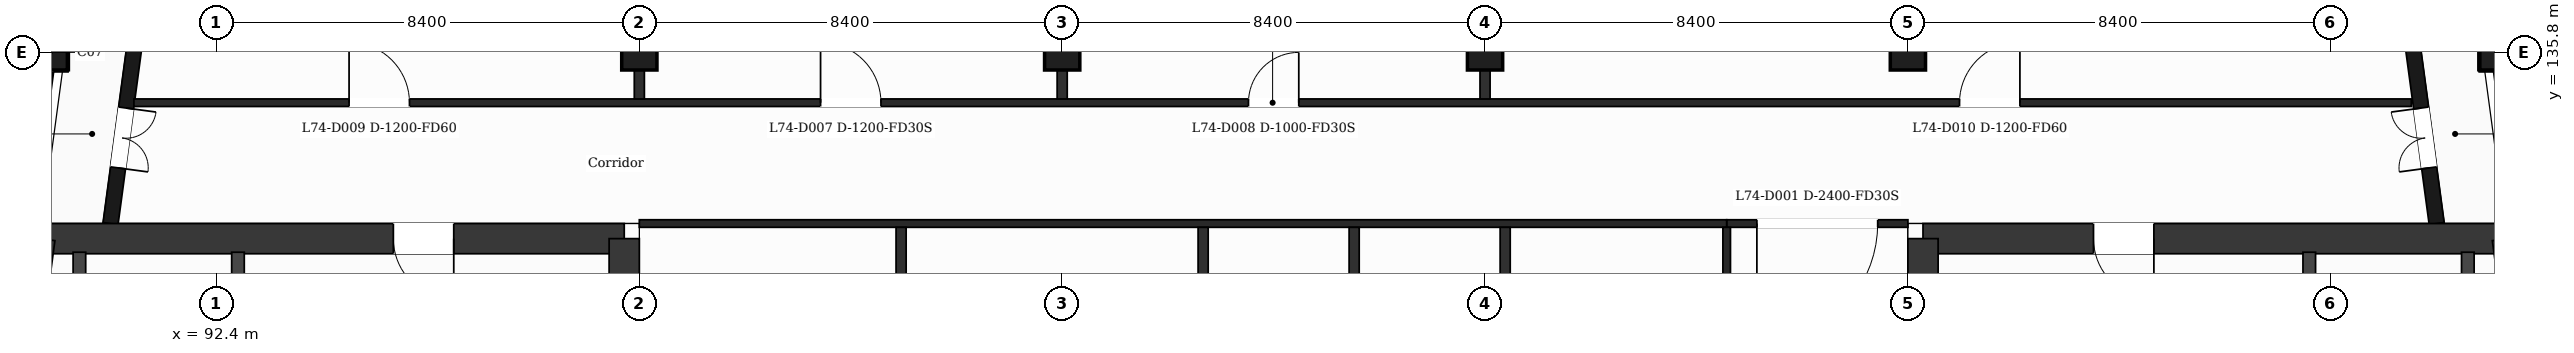
"""IFC4 building model, lengths in metres.
Left out: names, types, materials, properties, quantities, classifications, styles, units other than length and angle.
Written with IfcOpenShell. Run it as: python <this file> out.ifc"""

import sys

from ifc_helpers import new_model, si_unit, direction, frame, frame_2d, origin, origin_2d, place, context, subcontext, project, spatial, rectangle, extrude, element, fill, save


model = new_model("IFC4")
c1 = context("Model", 3, precision=1e-05, world=origin(), true_north=direction((0.0, 1.0)))
c2 = subcontext(c1, "Body", "Model", "MODEL_VIEW")
j1 = project(units=[si_unit("LENGTHUNIT", "METRE"), si_unit("PLANEANGLEUNIT", "RADIAN")], contexts=[c1])
p1 = place(None, origin())
s1 = spatial("IfcSite", under=j1, at=p1, CompositionType="ELEMENT")
p2 = place(p1, origin())
s2 = spatial("IfcBuilding", under=s1, at=p2, CompositionType="ELEMENT")
p3 = place(p2, frame((0.0, 0.0, 303.4)))
s3 = spatial("IfcBuildingStorey", under=s2, at=p3, CompositionType="ELEMENT", Elevation=303.4)
p4 = place(p3, frame((88.893, 132.1, 0.0), z_axis=(0.0, 0.0, 1.0), x_axis=(1.0, 0.0, 0.0)))
e1 = element("IfcWall", 1, at=p4, inside=s3, PredefinedType="SHEAR", context=c2, shape_type="SweptSolid", body=[
    extrude(rectangle(XDim=11.607, YDim=0.6, at=frame_2d((5.803, 0.0))), origin(), (0.0, 0.0, 1.0), 4.5),
])
p5 = place(p4, frame((7.021, 0.0, 0.0)))
e2 = element("IfcOpeningElement", 2, at=p5, cuts=e1, PredefinedType="OPENING", context=c2, shape_type="SweptSolid", body=[
    extrude(rectangle(XDim=1.2, YDim=2.1, at=frame_2d((0.6, 1.05))), frame((0.0, 0.31, 0.0), z_axis=(0.0, -1.0, 0.0), x_axis=(1.0, 0.0, 0.0)), (0.0, 0.0, 1.0), 0.62),
])
p6 = place(p3, frame((100.5, 132.1, 0.0), z_axis=(0.0, 0.0, 1.0), x_axis=(0.0, -1.0, 0.0)))
e3 = element("IfcWall", 3, at=p6, inside=s3, PredefinedType="SHEAR", context=c2, shape_type="SweptSolid", body=[
    extrude(rectangle(XDim=15.8, YDim=0.6, at=frame_2d((7.9, 0.0))), origin(), (0.0, 0.0, 1.0), 4.5),
])
p7 = place(p6, frame((7.95, 0.0, 0.0)))
e4 = element("IfcOpeningElement", 4, at=p7, cuts=e3, PredefinedType="OPENING", context=c2, shape_type="SweptSolid", body=[
    extrude(rectangle(XDim=1.4, YDim=2.1, at=frame_2d((0.7, 1.05))), frame((0.0, 0.31, 0.0), z_axis=(0.0, -1.0, 0.0), x_axis=(1.0, 0.0, 0.0)), (0.0, 0.0, 1.0), 0.62),
])
p8 = place(p3, frame((86.766, 116.3, 0.0), z_axis=(0.0, 0.0, 1.0), x_axis=(0.13341345841, 0.991060466932, 0.0)))
e5 = element("IfcWall", 5, at=p8, inside=s3, PredefinedType="SHEAR", context=c2, shape_type="SweptSolid", body=[
    extrude(rectangle(XDim=15.943, YDim=0.6, at=frame_2d((7.971, 0.0))), origin(), (0.0, 0.0, 1.0), 4.5),
])
p9 = place(p3, frame((126.3, 132.1, 0.0), z_axis=(0.0, 0.0, 1.0), x_axis=(1.0, 0.0, 0.0)))
e6 = element("IfcWall", 6, at=p9, inside=s3, PredefinedType="SHEAR", context=c2, shape_type="SweptSolid", body=[
    extrude(rectangle(XDim=11.607, YDim=0.6, at=frame_2d((5.803, 0.0))), origin(), (0.0, 0.0, 1.0), 4.5),
])
p10 = place(p9, frame((3.386, 0.0, 0.0)))
e7 = element("IfcOpeningElement", 7, at=p10, cuts=e6, PredefinedType="OPENING", context=c2, shape_type="SweptSolid", body=[
    extrude(rectangle(XDim=1.2, YDim=2.1, at=frame_2d((0.6, 1.05))), frame((0.0, 0.31, 0.0), z_axis=(0.0, -1.0, 0.0), x_axis=(1.0, 0.0, 0.0)), (0.0, 0.0, 1.0), 0.62),
])
p11 = place(p3, frame((137.907, 132.1, 0.0), z_axis=(0.0, 0.0, 1.0), x_axis=(0.13341345841, -0.991060466932, 0.0)))
e8 = element("IfcWall", 8, at=p11, inside=s3, PredefinedType="SHEAR", context=c2, shape_type="SweptSolid", body=[
    extrude(rectangle(XDim=15.943, YDim=0.6, at=frame_2d((7.971, 0.0))), origin(), (0.0, 0.0, 1.0), 4.5),
])
p12 = place(p3, frame((126.3, 116.3, 0.0), z_axis=(0.0, 0.0, 1.0), x_axis=(0.0, 1.0, 0.0)))
e9 = element("IfcWall", 9, at=p12, inside=s3, PredefinedType="SHEAR", context=c2, shape_type="SweptSolid", body=[
    extrude(rectangle(XDim=15.8, YDim=0.6, at=frame_2d((7.9, 0.0))), origin(), (0.0, 0.0, 1.0), 4.5),
])
p13 = place(p12, frame((6.45, 0.0, 0.0)))
e10 = element("IfcOpeningElement", 10, at=p13, cuts=e9, PredefinedType="OPENING", context=c2, shape_type="SweptSolid", body=[
    extrude(rectangle(XDim=1.4, YDim=2.1, at=frame_2d((0.7, 1.05))), frame((0.0, 0.31, 0.0), z_axis=(0.0, -1.0, 0.0), x_axis=(1.0, 0.0, 0.0)), (0.0, 0.0, 1.0), 0.62),
])
for number, where, z_axis, x_axis in (
    (11, (100.8, 135.8, 0.0), (0.0, 0.0, 1.0), (1.0, 0.0, 0.0)),
    (12, (109.2, 135.8, 0.0), (0.0, 0.0, 1.0), (1.0, 0.0, 0.0)),
    (13, (117.6, 135.8, 0.0), (0.0, 0.0, 1.0), (1.0, 0.0, 0.0)),
    (14, (126.0, 135.8, 0.0), (0.0, 0.0, 1.0), (1.0, 0.0, 0.0)),
    (15, (89.088, 135.8, 0.0), (0.0, 0.0, 1.0), (1.0, 0.0, 0.0)),
    (16, (137.711, 135.8, 0.0), (0.0, 0.0, 1.0), (1.0, 0.0, 0.0)),
):
    element("IfcColumn", number, at=place(p3, frame(where, z_axis=z_axis, x_axis=x_axis)), inside=s3, PredefinedType="COLUMN", context=c2, shape_type="SweptSolid", body=[
        extrude(rectangle(XDim=0.7, YDim=0.7, at=origin_2d()), origin(), (0.0, 0.0, 1.0), 4.5),
    ])
p14 = place(p3, frame((91.177, 138.95, 0.0), z_axis=(0.0, 0.0, 1.0), x_axis=(-0.133426664613, -0.991058689065, 0.0)))
e17 = element("IfcWall", 17, at=p14, inside=s3, PredefinedType="SOLIDWALL", context=c2, shape_type="SweptSolid", body=[
    extrude(rectangle(XDim=6.609, YDim=0.3, at=frame_2d((3.305, 0.0))), origin(), (0.0, 0.0, 1.0), 4.05),
])
p15 = place(p14, frame((1.039, 0.0, 0.9)))
e18 = element("IfcOpeningElement", 18, at=p15, cuts=e17, PredefinedType="OPENING", context=c2, shape_type="SweptSolid", body=[
    extrude(rectangle(XDim=1.2, YDim=2.1, at=frame_2d((0.6, 1.05))), frame((0.0, 0.16, 0.0), z_axis=(0.0, -1.0, 0.0), x_axis=(1.0, 0.0, 0.0)), (0.0, 0.0, 1.0), 0.32),
])
p16 = place(p14, frame((4.294, 0.0, 0.0)))
e19 = element("IfcOpeningElement", 19, at=p16, cuts=e17, PredefinedType="OPENING", context=c2, shape_type="SweptSolid", body=[
    extrude(rectangle(XDim=1.2, YDim=2.4, at=frame_2d((0.6, 1.2))), frame((0.0, 0.16, 0.0), z_axis=(0.0, -1.0, 0.0), x_axis=(1.0, 0.0, 0.0)), (0.0, 0.0, 1.0), 0.32),
])
p17 = place(p3, frame((136.504, 132.4, 0.0), z_axis=(0.0, 0.0, 1.0), x_axis=(-0.133399697462, 0.99106231929, 0.0)))
e20 = element("IfcWall", 20, at=p17, inside=s3, PredefinedType="SOLIDWALL", context=c2, shape_type="SweptSolid", body=[
    extrude(rectangle(XDim=6.74, YDim=0.3, at=frame_2d((3.37, 0.0))), origin(), (0.0, 0.0, 1.0), 4.05),
])
p18 = place(p17, frame((1.115, 0.0, 0.0)))
e21 = element("IfcOpeningElement", 21, at=p18, cuts=e20, PredefinedType="OPENING", context=c2, shape_type="SweptSolid", body=[
    extrude(rectangle(XDim=1.2, YDim=2.4, at=frame_2d((0.6, 1.2))), frame((0.0, 0.16, 0.0), z_axis=(0.0, -1.0, 0.0), x_axis=(1.0, 0.0, 0.0)), (0.0, 0.0, 1.0), 0.32),
])
p19 = place(p17, frame((3.835, 0.0, 0.9)))
e22 = element("IfcOpeningElement", 22, at=p19, cuts=e20, PredefinedType="OPENING", context=c2, shape_type="SweptSolid", body=[
    extrude(rectangle(XDim=2.4, YDim=2.1, at=frame_2d((1.2, 1.05))), frame((0.0, 0.16, 0.0), z_axis=(0.0, -1.0, 0.0), x_axis=(1.0, 0.0, 0.0)), (0.0, 0.0, 1.0), 0.32),
])
p20 = place(p3, frame((122.4, 132.4, 0.0), z_axis=(0.0, 0.0, 1.0), x_axis=(1.0, 0.0, 0.0)))
e23 = element("IfcWall", 23, at=p20, inside=s3, PredefinedType="PARTITIONING", context=c2, shape_type="SweptSolid", body=[
    extrude(rectangle(XDim=3.6, YDim=0.15, at=frame_2d((1.8, 0.0))), origin(), (0.0, 0.0, 1.0), 4.05),
])
p21 = place(p20, frame((0.6, 0.0, 0.0)))
e24 = element("IfcOpeningElement", 24, at=p21, cuts=e23, PredefinedType="OPENING", context=c2, shape_type="SweptSolid", body=[
    extrude(rectangle(XDim=2.4, YDim=2.1, at=frame_2d((1.2, 1.05))), frame((0.0, 0.085, 0.0), z_axis=(0.0, -1.0, 0.0), x_axis=(1.0, 0.0, 0.0)), (0.0, 0.0, 1.0), 0.17),
])
p22 = place(p3, frame((100.8, 132.4, 0.0), z_axis=(0.0, 0.0, 1.0), x_axis=(1.0, 0.0, 0.0)))
e25 = element("IfcWall", 25, at=p22, inside=s3, PredefinedType="PARTITIONING", context=c2, shape_type="SweptSolid", body=[
    extrude(rectangle(XDim=21.6, YDim=0.15, at=frame_2d((10.8, 0.0))), origin(), (0.0, 0.0, 1.0), 4.05),
])
p23 = place(p3, frame((90.76, 134.8, 0.0), z_axis=(0.0, 0.0, 1.0), x_axis=(1.0, 0.0, 0.0)))
e26 = element("IfcWall", 26, at=p23, inside=s3, PredefinedType="PARTITIONING", context=c2, shape_type="SweptSolid", body=[
    extrude(rectangle(XDim=45.24, YDim=0.15, at=frame_2d((22.62, 0.0))), origin(), (0.0, 0.0, 1.0), 4.05),
])
p24 = place(p23, frame((13.64, 0.0, 0.0)))
e27 = element("IfcOpeningElement", 27, at=p24, cuts=e26, PredefinedType="OPENING", context=c2, shape_type="SweptSolid", body=[
    extrude(rectangle(XDim=1.2, YDim=2.1, at=frame_2d((0.6, 1.05))), frame((0.0, 0.085, 0.0), z_axis=(0.0, -1.0, 0.0), x_axis=(1.0, 0.0, 0.0)), (0.0, 0.0, 1.0), 0.17),
])
p25 = place(p23, frame((22.14, 0.0, 0.0)))
e28 = element("IfcOpeningElement", 28, at=p25, cuts=e26, PredefinedType="OPENING", context=c2, shape_type="SweptSolid", body=[
    extrude(rectangle(XDim=1.0, YDim=2.1, at=frame_2d((0.5, 1.05))), frame((0.0, 0.085, 0.0), z_axis=(0.0, -1.0, 0.0), x_axis=(1.0, 0.0, 0.0)), (0.0, 0.0, 1.0), 0.17),
])
p26 = place(p23, frame((4.274, 0.0, 0.0)))
e29 = element("IfcOpeningElement", 29, at=p26, cuts=e26, PredefinedType="OPENING", context=c2, shape_type="SweptSolid", body=[
    extrude(rectangle(XDim=1.2, YDim=2.1, at=frame_2d((0.6, 1.05))), frame((0.0, 0.085, 0.0), z_axis=(0.0, -1.0, 0.0), x_axis=(1.0, 0.0, 0.0)), (0.0, 0.0, 1.0), 0.17),
])
p27 = place(p23, frame((36.265, 0.0, 0.0)))
e30 = element("IfcOpeningElement", 30, at=p27, cuts=e26, PredefinedType="OPENING", context=c2, shape_type="SweptSolid", body=[
    extrude(rectangle(XDim=1.2, YDim=2.1, at=frame_2d((0.6, 1.05))), frame((0.0, 0.085, 0.0), z_axis=(0.0, -1.0, 0.0), x_axis=(1.0, 0.0, 0.0)), (0.0, 0.0, 1.0), 0.17),
])
p28 = place(p3, frame((89.677, 124.575, 0.0), z_axis=(0.0, 0.0, 1.0), x_axis=(0.0, 1.0, 0.0)))
e31 = element("IfcWall", 31, at=p28, inside=s3, PredefinedType="PARTITIONING", context=c2, shape_type="SweptSolid", body=[
    extrude(rectangle(XDim=7.255, YDim=0.25, at=frame_2d((3.627, 0.0))), origin(), (0.0, 0.0, 1.0), 4.05),
])
p29 = place(p3, frame((92.827, 124.575, 0.0), z_axis=(0.0, 0.0, 1.0), x_axis=(0.0, 1.0, 0.0)))
e32 = element("IfcWall", 32, at=p29, inside=s3, PredefinedType="PARTITIONING", context=c2, shape_type="SweptSolid", body=[
    extrude(rectangle(XDim=7.255, YDim=0.25, at=frame_2d((3.627, 0.0))), origin(), (0.0, 0.0, 1.0), 4.05),
])
p30 = place(p29, frame((5.325, 0.0, 0.0)))
e33 = element("IfcOpeningElement", 33, at=p30, cuts=e32, PredefinedType="OPENING", context=c2, shape_type="SweptSolid", body=[
    extrude(rectangle(XDim=1.0, YDim=2.1, at=frame_2d((0.5, 1.05))), frame((0.0, 0.135, 0.0), z_axis=(0.0, -1.0, 0.0), x_axis=(1.0, 0.0, 0.0)), (0.0, 0.0, 1.0), 0.27),
])
p31 = place(p3, frame((100.8, 134.875, 0.0), z_axis=(0.0, 0.0, 1.0), x_axis=(0.0, 1.0, 0.0)))
e34 = element("IfcWall", 34, at=p31, inside=s3, PredefinedType="PARTITIONING", context=c2, shape_type="SweptSolid", body=[
    extrude(rectangle(XDim=8.135, YDim=0.2, at=frame_2d((4.067, 0.0))), origin(), (0.0, 0.0, 1.0), 4.05),
])
p32 = place(p3, frame((106.0, 125.575, 0.0), z_axis=(0.0, 0.0, 1.0), x_axis=(0.0, 1.0, 0.0)))
e35 = element("IfcWall", 35, at=p32, inside=s3, PredefinedType="PARTITIONING", context=c2, shape_type="SweptSolid", body=[
    extrude(rectangle(XDim=6.75, YDim=0.2, at=frame_2d((3.375, 0.0))), origin(), (0.0, 0.0, 1.0), 4.05),
])
p33 = place(p3, frame((109.2, 134.875, 0.0), z_axis=(0.0, 0.0, 1.0), x_axis=(0.0, 1.0, 0.0)))
e36 = element("IfcWall", 36, at=p33, inside=s3, PredefinedType="PARTITIONING", context=c2, shape_type="SweptSolid", body=[
    extrude(rectangle(XDim=8.135, YDim=0.2, at=frame_2d((4.067, 0.0))), origin(), (0.0, 0.0, 1.0), 4.05),
])
for number, where, z_axis, x_axis in (
    (37, (112.0, 125.575, 0.0), (0.0, 0.0, 1.0), (0.0, 1.0, 0.0)),
    (38, (115.0, 125.575, 0.0), (0.0, 0.0, 1.0), (0.0, 1.0, 0.0)),
):
    element("IfcWall", number, at=place(p3, frame(where, z_axis=z_axis, x_axis=x_axis)), inside=s3, PredefinedType="PARTITIONING", context=c2, shape_type="SweptSolid", body=[
        extrude(rectangle(XDim=6.75, YDim=0.2, at=frame_2d((3.375, 0.0))), origin(), (0.0, 0.0, 1.0), 4.05),
    ])
p34 = place(p3, frame((117.6, 134.875, 0.0), z_axis=(0.0, 0.0, 1.0), x_axis=(0.0, 1.0, 0.0)))
e39 = element("IfcWall", 39, at=p34, inside=s3, PredefinedType="PARTITIONING", context=c2, shape_type="SweptSolid", body=[
    extrude(rectangle(XDim=8.135, YDim=0.2, at=frame_2d((4.067, 0.0))), origin(), (0.0, 0.0, 1.0), 4.05),
])
p35 = place(p3, frame((118.0, 125.575, 0.0), z_axis=(0.0, 0.0, 1.0), x_axis=(0.0, 1.0, 0.0)))
e40 = element("IfcWall", 40, at=p35, inside=s3, PredefinedType="PARTITIONING", context=c2, shape_type="SweptSolid", body=[
    extrude(rectangle(XDim=6.75, YDim=0.2, at=frame_2d((3.375, 0.0))), origin(), (0.0, 0.0, 1.0), 4.05),
])
p36 = place(p3, frame((122.4, 125.575, 0.0), z_axis=(0.0, 0.0, 1.0), x_axis=(0.0, 1.0, 0.0)))
e41 = element("IfcWall", 41, at=p36, inside=s3, PredefinedType="PARTITIONING", context=c2, shape_type="SweptSolid", body=[
    extrude(rectangle(XDim=6.75, YDim=0.15, at=frame_2d((3.375, 0.0))), origin(), (0.0, 0.0, 1.0), 4.05),
])
p37 = place(p36, frame((2.875, 0.0, 0.0)))
e42 = element("IfcOpeningElement", 42, at=p37, cuts=e41, PredefinedType="OPENING", context=c2, shape_type="SweptSolid", body=[
    extrude(rectangle(XDim=1.0, YDim=2.1, at=frame_2d((0.5, 1.05))), frame((0.0, 0.085, 0.0), z_axis=(0.0, -1.0, 0.0), x_axis=(1.0, 0.0, 0.0)), (0.0, 0.0, 1.0), 0.17),
])
p38 = place(p3, frame((133.973, 124.575, 0.0), z_axis=(0.0, 0.0, 1.0), x_axis=(0.0, 1.0, 0.0)))
e43 = element("IfcWall", 43, at=p38, inside=s3, PredefinedType="PARTITIONING", context=c2, shape_type="SweptSolid", body=[
    extrude(rectangle(XDim=7.255, YDim=0.25, at=frame_2d((3.627, 0.0))), origin(), (0.0, 0.0, 1.0), 4.05),
])
p39 = place(p38, frame((5.325, 0.0, 0.0)))
e44 = element("IfcOpeningElement", 44, at=p39, cuts=e43, PredefinedType="OPENING", context=c2, shape_type="SweptSolid", body=[
    extrude(rectangle(XDim=1.0, YDim=2.1, at=frame_2d((0.5, 1.05))), frame((0.0, 0.135, 0.0), z_axis=(0.0, -1.0, 0.0), x_axis=(1.0, 0.0, 0.0)), (0.0, 0.0, 1.0), 0.27),
])
p40 = place(p3, frame((137.123, 124.575, 0.0), z_axis=(0.0, 0.0, 1.0), x_axis=(0.0, 1.0, 0.0)))
e45 = element("IfcWall", 45, at=p40, inside=s3, PredefinedType="PARTITIONING", context=c2, shape_type="SweptSolid", body=[
    extrude(rectangle(XDim=7.255, YDim=0.25, at=frame_2d((3.627, 0.0))), origin(), (0.0, 0.0, 1.0), 4.05),
])
p41 = place(p16, origin())
e46 = element("IfcDoor", 46, at=p41, inside=s3, OperationType="DOUBLE_DOOR_SINGLE_SWING", PredefinedType="DOOR", context=c2, shape_type="SweptSolid", body=[
    extrude(rectangle(XDim=1.2, YDim=2.4, at=frame_2d((0.6, 1.2))), frame((0.0, 0.025, 0.0), z_axis=(0.0, -1.0, 0.0), x_axis=(1.0, 0.0, 0.0)), (0.0, 0.0, 1.0), 0.05),
])
fill(e19, e46)
p42 = place(p18, origin())
e47 = element("IfcDoor", 47, at=p42, inside=s3, OperationType="DOUBLE_DOOR_SINGLE_SWING", PredefinedType="DOOR", context=c2, shape_type="SweptSolid", body=[
    extrude(rectangle(XDim=1.2, YDim=2.4, at=frame_2d((0.6, 1.2))), frame((0.0, 0.025, 0.0), z_axis=(0.0, -1.0, 0.0), x_axis=(1.0, 0.0, 0.0)), (0.0, 0.0, 1.0), 0.05),
])
fill(e21, e47)
p43 = place(p21, origin())
e48 = element("IfcDoor", 48, at=p43, inside=s3, OperationType="SINGLE_SWING_LEFT", PredefinedType="DOOR", context=c2, shape_type="SweptSolid", body=[
    extrude(rectangle(XDim=2.4, YDim=2.1, at=frame_2d((1.2, 1.05))), frame((0.0, 0.025, 0.0), z_axis=(0.0, -1.0, 0.0), x_axis=(1.0, 0.0, 0.0)), (0.0, 0.0, 1.0), 0.05),
])
fill(e24, e48)
p44 = place(p24, origin())
e49 = element("IfcDoor", 49, at=p44, inside=s3, OperationType="SINGLE_SWING_LEFT", PredefinedType="DOOR", context=c2, shape_type="SweptSolid", body=[
    extrude(rectangle(XDim=1.2, YDim=2.1, at=frame_2d((0.6, 1.05))), frame((0.0, 0.025, 0.0), z_axis=(0.0, -1.0, 0.0), x_axis=(1.0, 0.0, 0.0)), (0.0, 0.0, 1.0), 0.05),
])
fill(e27, e49)
p45 = place(p25, origin())
e50 = element("IfcDoor", 50, at=p45, inside=s3, OperationType="SINGLE_SWING_RIGHT", PredefinedType="DOOR", context=c2, shape_type="SweptSolid", body=[
    extrude(rectangle(XDim=1.0, YDim=2.1, at=frame_2d((0.5, 1.05))), frame((0.0, 0.025, 0.0), z_axis=(0.0, -1.0, 0.0), x_axis=(1.0, 0.0, 0.0)), (0.0, 0.0, 1.0), 0.05),
])
fill(e28, e50)
p46 = place(p26, origin())
e51 = element("IfcDoor", 51, at=p46, inside=s3, OperationType="SINGLE_SWING_LEFT", PredefinedType="DOOR", context=c2, shape_type="SweptSolid", body=[
    extrude(rectangle(XDim=1.2, YDim=2.1, at=frame_2d((0.6, 1.05))), frame((0.0, 0.025, 0.0), z_axis=(0.0, -1.0, 0.0), x_axis=(1.0, 0.0, 0.0)), (0.0, 0.0, 1.0), 0.05),
])
fill(e29, e51)
p47 = place(p27, origin())
e52 = element("IfcDoor", 52, at=p47, inside=s3, OperationType="SINGLE_SWING_RIGHT", PredefinedType="DOOR", context=c2, shape_type="SweptSolid", body=[
    extrude(rectangle(XDim=1.2, YDim=2.1, at=frame_2d((0.6, 1.05))), frame((0.0, 0.025, 0.0), z_axis=(0.0, -1.0, 0.0), x_axis=(1.0, 0.0, 0.0)), (0.0, 0.0, 1.0), 0.05),
])
fill(e30, e52)
p48 = place(p5, origin())
e53 = element("IfcDoor", 53, at=p48, inside=s3, OperationType="SINGLE_SWING_RIGHT", PredefinedType="DOOR", context=c2, shape_type="SweptSolid", body=[
    extrude(rectangle(XDim=1.2, YDim=2.1, at=frame_2d((0.6, 1.05))), frame((0.0, 0.025, 0.0), z_axis=(0.0, -1.0, 0.0), x_axis=(1.0, 0.0, 0.0)), (0.0, 0.0, 1.0), 0.05),
])
fill(e2, e53)
p49 = place(p10, origin())
e54 = element("IfcDoor", 54, at=p49, inside=s3, OperationType="SINGLE_SWING_RIGHT", PredefinedType="DOOR", context=c2, shape_type="SweptSolid", body=[
    extrude(rectangle(XDim=1.2, YDim=2.1, at=frame_2d((0.6, 1.05))), frame((0.0, 0.025, 0.0), z_axis=(0.0, -1.0, 0.0), x_axis=(1.0, 0.0, 0.0)), (0.0, 0.0, 1.0), 0.05),
])
fill(e7, e54)
save(model, sys.argv[1])
